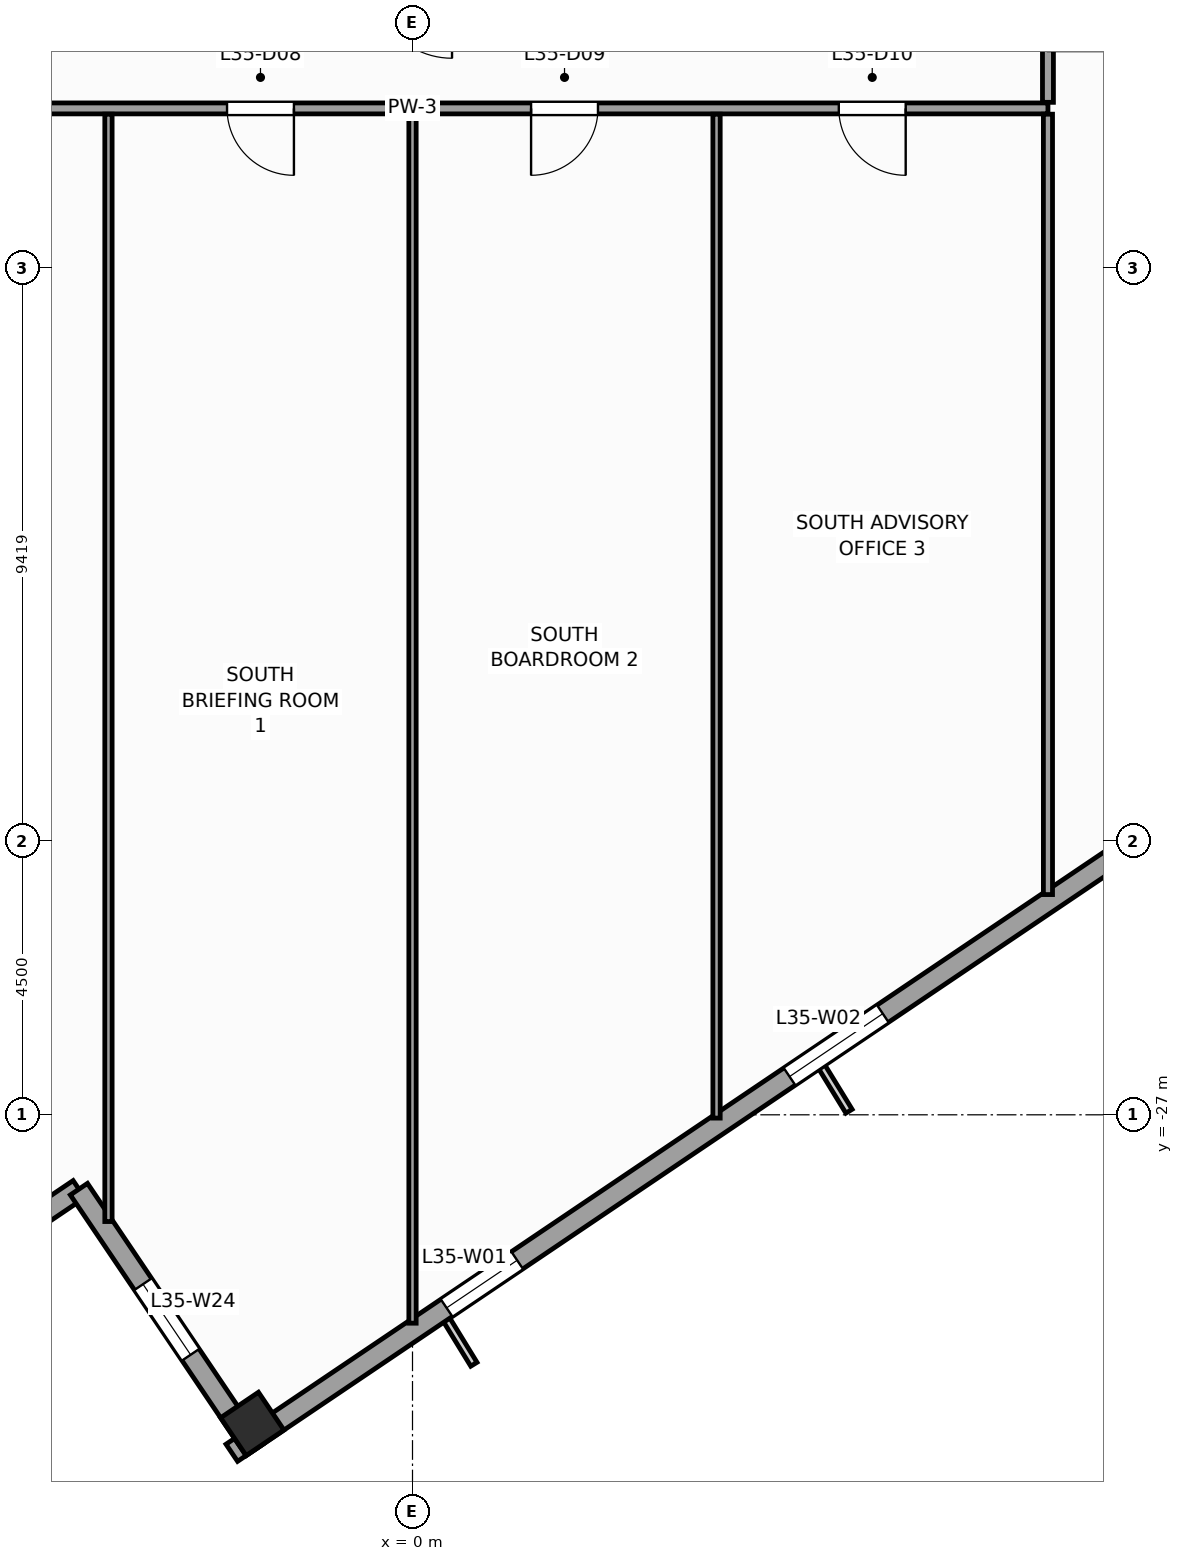
"""IFC4 building model, lengths in metres.
Left out: names, types, materials, properties, quantities, classifications, styles, units other than length and angle.
Written with IfcOpenShell. Run it as: python <this file> out.ifc"""

import sys

from ifc_helpers import new_model, si_unit, direction, frame, frame_2d, origin, origin_2d, place, context, subcontext, project, spatial, rectangle, extrude, source, transform, mapped, element, fill, save


model = new_model("IFC4")
c1 = context("Model", 3, precision=1e-05, world=origin(), true_north=direction((0.0, 1.0)))
c2 = subcontext(c1, "Body", "Model", "MODEL_VIEW")
j1 = project(units=[si_unit("LENGTHUNIT", "METRE"), si_unit("PLANEANGLEUNIT", "RADIAN")], contexts=[c1])
p1 = place(None, origin())
s1 = spatial("IfcSite", under=j1, at=p1, CompositionType="ELEMENT")
p2 = place(p1, origin())
s2 = spatial("IfcBuilding", under=s1, at=p2, CompositionType="ELEMENT")
p3 = place(p2, frame((0.0, 0.0, 148.4)))
s3 = spatial("IfcBuildingStorey", under=s2, at=p3, CompositionType="ELEMENT", Elevation=148.4)
m1 = source(origin(), c2, "Body", "SweptSolid", [
    extrude(rectangle(XDim=0.75, YDim=0.75, at=origin_2d()), origin(), (0.0, 0.0, 1.0), 4.0),
])
p4 = place(p3, frame((-2.635, -32.083, 0.0), z_axis=(0.0, 0.0, 1.0), x_axis=(0.829037572555, 0.559192903471, 0.0)))
e1 = element("IfcColumn", 1, at=p4, inside=s3, PredefinedType="COLUMN", context=c2, shape_type="MappedRepresentation", body=[
    mapped(m1, transform((0.0, 0.0, 0.0), scale=1.0)),
])
p5 = place(p3, frame((-2.972, -32.558, 0.0), z_axis=(0.0, 0.0, 1.0), x_axis=(0.829036218961, 0.559194910251, 0.0)))
e2 = element("IfcWall", 2, at=p5, inside=s3, PredefinedType="STANDARD", context=c2, shape_type="SweptSolid", body=[
    extrude(rectangle(XDim=41.34, YDim=0.34, at=frame_2d((20.67, 0.0))), origin(), (0.0, 0.0, 1.0), 3.04),
])
p6 = place(p5, frame((25.745, 0.0, 0.0)))
e3 = element("IfcOpeningElement", 3, at=p6, cuts=e2, PredefinedType="OPENING", context=c2, shape_type="SweptSolid", body=[
    extrude(rectangle(XDim=1.05, YDim=2.25, at=frame_2d((0.525, 1.125))), frame((0.0, 0.18, 0.0), z_axis=(0.0, -1.0, 0.0), x_axis=(1.0, 0.0, 0.0)), (0.0, 0.0, 1.0), 0.36),
])
p7 = place(p5, frame((4.261, 0.0, 0.56)))
e4 = element("IfcOpeningElement", 4, at=p7, cuts=e2, PredefinedType="OPENING", context=c2, shape_type="SweptSolid", body=[
    extrude(rectangle(XDim=1.4, YDim=2.4, at=frame_2d((0.7, 1.2))), frame((0.0, 0.18, 0.0), z_axis=(0.0, -1.0, 0.0), x_axis=(1.0, 0.0, 0.0)), (0.0, 0.0, 1.0), 0.36),
])
p8 = place(p5, frame((11.064, 0.0, 0.61)))
e5 = element("IfcOpeningElement", 5, at=p8, cuts=e2, PredefinedType="OPENING", context=c2, shape_type="SweptSolid", body=[
    extrude(rectangle(XDim=1.85, YDim=2.35, at=frame_2d((0.925, 1.175))), frame((0.0, 0.18, 0.0), z_axis=(0.0, -1.0, 0.0), x_axis=(1.0, 0.0, 0.0)), (0.0, 0.0, 1.0), 0.36),
])
p9 = place(p5, frame((18.168, 0.0, 0.61)))
e6 = element("IfcOpeningElement", 6, at=p9, cuts=e2, PredefinedType="OPENING", context=c2, shape_type="SweptSolid", body=[
    extrude(rectangle(XDim=1.85, YDim=2.35, at=frame_2d((0.925, 1.175))), frame((0.0, 0.18, 0.0), z_axis=(0.0, -1.0, 0.0), x_axis=(1.0, 0.0, 0.0)), (0.0, 0.0, 1.0), 0.36),
])
p10 = place(p5, frame((27.936, 0.0, 0.61)))
e7 = element("IfcOpeningElement", 7, at=p10, cuts=e2, PredefinedType="OPENING", context=c2, shape_type="SweptSolid", body=[
    extrude(rectangle(XDim=1.85, YDim=2.35, at=frame_2d((0.925, 1.175))), frame((0.0, 0.18, 0.0), z_axis=(0.0, -1.0, 0.0), x_axis=(1.0, 0.0, 0.0)), (0.0, 0.0, 1.0), 0.36),
])
p11 = place(p5, frame((34.852, 0.0, 0.56)))
e8 = element("IfcOpeningElement", 8, at=p11, cuts=e2, PredefinedType="OPENING", context=c2, shape_type="SweptSolid", body=[
    extrude(rectangle(XDim=1.4, YDim=2.4, at=frame_2d((0.7, 1.2))), frame((0.0, 0.18, 0.0), z_axis=(0.0, -1.0, 0.0), x_axis=(1.0, 0.0, 0.0)), (0.0, 0.0, 1.0), 0.36),
])
p12 = place(p3, frame((-9.631, -31.019, 0.0), z_axis=(0.0, 0.0, 1.0), x_axis=(0.829025804298, 0.559210350234, 0.0)))
e9 = element("IfcWall", 9, at=p12, inside=s3, PredefinedType="STANDARD", context=c2, shape_type="SweptSolid", body=[
    extrude(rectangle(XDim=5.0, YDim=0.34, at=frame_2d((2.5, 0.0))), origin(), (0.0, 0.0, 1.0), 3.74),
])
p13 = place(p3, frame((-5.486, -28.223, 0.0), z_axis=(0.0, 0.0, 1.0), x_axis=(0.559171107879, -0.82905227345, 0.0)))
e10 = element("IfcWall", 10, at=p13, inside=s3, PredefinedType="STANDARD", context=c2, shape_type="SweptSolid", body=[
    extrude(rectangle(XDim=5.17, YDim=0.34, at=frame_2d((2.585, 0.0))), origin(), (0.0, 0.0, 1.0), 3.04),
])
p14 = place(p13, frame((1.885, 0.0, 0.56)))
e11 = element("IfcOpeningElement", 11, at=p14, cuts=e10, PredefinedType="OPENING", context=c2, shape_type="SweptSolid", body=[
    extrude(rectangle(XDim=1.4, YDim=2.4, at=frame_2d((0.7, 1.2))), frame((0.0, 0.18, 0.0), z_axis=(0.0, -1.0, 0.0), x_axis=(1.0, 0.0, 0.0)), (0.0, 0.0, 1.0), 0.36),
])
p15 = place(p3, frame((-10.45, -10.45, 0.0), z_axis=(0.0, 0.0, 1.0), x_axis=(1.0, 0.0, 0.0)))
e12 = element("IfcWall", 12, at=p15, inside=s3, PredefinedType="PARTITIONING", context=c2, shape_type="SweptSolid", body=[
    extrude(rectangle(XDim=20.9, YDim=0.18, at=frame_2d((10.45, 0.0))), origin(), (0.0, 0.0, 1.0), 3.74),
])
p16 = place(p15, frame((2.339, 0.0, 0.0)))
e13 = element("IfcOpeningElement", 13, at=p16, cuts=e12, PredefinedType="OPENING", context=c2, shape_type="SweptSolid", body=[
    extrude(rectangle(XDim=1.1, YDim=2.2, at=frame_2d((0.55, 1.1))), frame((0.0, 0.1, 0.0), z_axis=(0.0, -1.0, 0.0), x_axis=(1.0, 0.0, 0.0)), (0.0, 0.0, 1.0), 0.2),
])
p17 = place(p15, frame((7.4, 0.0, 0.0)))
e14 = element("IfcOpeningElement", 14, at=p17, cuts=e12, PredefinedType="OPENING", context=c2, shape_type="SweptSolid", body=[
    extrude(rectangle(XDim=1.1, YDim=2.2, at=frame_2d((0.55, 1.1))), frame((0.0, 0.1, 0.0), z_axis=(0.0, -1.0, 0.0), x_axis=(1.0, 0.0, 0.0)), (0.0, 0.0, 1.0), 0.2),
])
p18 = place(p15, frame((12.4, 0.0, 0.0)))
e15 = element("IfcOpeningElement", 15, at=p18, cuts=e12, PredefinedType="OPENING", context=c2, shape_type="SweptSolid", body=[
    extrude(rectangle(XDim=1.1, YDim=2.2, at=frame_2d((0.55, 1.1))), frame((0.0, 0.1, 0.0), z_axis=(0.0, -1.0, 0.0), x_axis=(1.0, 0.0, 0.0)), (0.0, 0.0, 1.0), 0.2),
])
p19 = place(p15, frame((17.46, 0.0, 0.0)))
e16 = element("IfcOpeningElement", 16, at=p19, cuts=e12, PredefinedType="OPENING", context=c2, shape_type="SweptSolid", body=[
    extrude(rectangle(XDim=1.1, YDim=2.2, at=frame_2d((0.55, 1.1))), frame((0.0, 0.1, 0.0), z_axis=(0.0, -1.0, 0.0), x_axis=(1.0, 0.0, 0.0)), (0.0, 0.0, 1.0), 0.2),
])
p20 = place(p3, frame((10.45, -10.35, 0.0), z_axis=(0.0, 0.0, 1.0), x_axis=(0.0, 1.0, 0.0)))
e17 = element("IfcWall", 17, at=p20, inside=s3, PredefinedType="PARTITIONING", context=c2, shape_type="SweptSolid", body=[
    extrude(rectangle(XDim=8.95, YDim=0.18, at=frame_2d((4.475, 0.0))), origin(), (0.0, 0.0, 1.0), 3.74),
])
p21 = place(p20, frame((1.455, 0.0, 0.0)))
e18 = element("IfcOpeningElement", 18, at=p21, cuts=e17, PredefinedType="OPENING", context=c2, shape_type="SweptSolid", body=[
    extrude(rectangle(XDim=0.95, YDim=2.1, at=frame_2d((0.475, 1.05))), frame((0.0, 0.1, 0.0), z_axis=(0.0, -1.0, 0.0), x_axis=(1.0, 0.0, 0.0)), (0.0, 0.0, 1.0), 0.2),
])
p22 = place(p20, frame((3.879, 0.0, 0.0)))
e19 = element("IfcOpeningElement", 19, at=p22, cuts=e17, PredefinedType="OPENING", context=c2, shape_type="SweptSolid", body=[
    extrude(rectangle(XDim=0.95, YDim=2.1, at=frame_2d((0.475, 1.05))), frame((0.0, 0.1, 0.0), z_axis=(0.0, -1.0, 0.0), x_axis=(1.0, 0.0, 0.0)), (0.0, 0.0, 1.0), 0.2),
])
p23 = place(p20, frame((6.494, 0.0, 0.0)))
e20 = element("IfcOpeningElement", 20, at=p23, cuts=e17, PredefinedType="OPENING", context=c2, shape_type="SweptSolid", body=[
    extrude(rectangle(XDim=1.1, YDim=2.2, at=frame_2d((0.55, 1.1))), frame((0.0, 0.1, 0.0), z_axis=(0.0, -1.0, 0.0), x_axis=(1.0, 0.0, 0.0)), (0.0, 0.0, 1.0), 0.2),
])
p24 = place(p3, frame((-5.0, -28.755, 0.0), z_axis=(0.0, 0.0, 1.0), x_axis=(0.0, 1.0, 0.0)))
e21 = element("IfcWall", 21, at=p24, inside=s3, PredefinedType="PARTITIONING", context=c2, shape_type="SweptSolid", body=[
    extrude(rectangle(XDim=18.21, YDim=0.12, at=frame_2d((9.105, 0.0))), origin(), (0.0, 0.0, 1.0), 3.74),
])
p25 = place(p3, frame((0.0, -30.427, 0.0), z_axis=(0.0, 0.0, 1.0), x_axis=(0.0, 1.0, 0.0)))
e22 = element("IfcWall", 22, at=p25, inside=s3, PredefinedType="PARTITIONING", context=c2, shape_type="SweptSolid", body=[
    extrude(rectangle(XDim=19.882, YDim=0.12, at=frame_2d((9.941, 0.0))), origin(), (0.0, 0.0, 1.0), 3.74),
])
p26 = place(p3, frame((5.0, -27.054, 0.0), z_axis=(0.0, 0.0, 1.0), x_axis=(0.0, 1.0, 0.0)))
e23 = element("IfcWall", 23, at=p26, inside=s3, PredefinedType="PARTITIONING", context=c2, shape_type="SweptSolid", body=[
    extrude(rectangle(XDim=16.509, YDim=0.12, at=frame_2d((8.255, 0.0))), origin(), (0.0, 0.0, 1.0), 3.74),
])
p27 = place(p3, frame((10.45, -23.378, 0.0), z_axis=(0.0, 0.0, 1.0), x_axis=(0.0, 1.0, 0.0)))
e24 = element("IfcWall", 24, at=p27, inside=s3, PredefinedType="PARTITIONING", context=c2, shape_type="SweptSolid", body=[
    extrude(rectangle(XDim=12.833, YDim=0.15, at=frame_2d((6.417, 0.0))), origin(), (0.0, 0.0, 1.0), 3.74),
])
m2 = source(origin(), c2, "Body", "SweptSolid", [
    extrude(rectangle(XDim=1.4, YDim=2.4, at=frame_2d((0.7, 1.2))), frame((0.0, 0.03, 0.0), z_axis=(0.0, -1.0, 0.0), x_axis=(1.0, 0.0, 0.0)), (0.0, 0.0, 1.0), 0.06),
])
p28 = place(p7, origin())
e25 = element("IfcWindow", 25, at=p28, inside=s3, PartitioningType="SINGLE_PANEL", PredefinedType="WINDOW", context=c2, shape_type="MappedRepresentation", body=[
    mapped(m2, transform((0.0, 0.0, 0.0), scale=1.0)),
])
fill(e4, e25)
m3 = source(origin(), c2, "Body", "SweptSolid", [
    extrude(rectangle(XDim=1.85, YDim=2.35, at=frame_2d((0.925, 1.175))), frame((0.0, 0.03, 0.0), z_axis=(0.0, -1.0, 0.0), x_axis=(1.0, 0.0, 0.0)), (0.0, 0.0, 1.0), 0.06),
])
p29 = place(p8, origin())
e26 = element("IfcWindow", 26, at=p29, inside=s3, PartitioningType="SINGLE_PANEL", PredefinedType="WINDOW", context=c2, shape_type="MappedRepresentation", body=[
    mapped(m3, transform((0.0, 0.0, 0.0), scale=1.0)),
])
fill(e5, e26)
p30 = place(p14, origin())
e27 = element("IfcWindow", 27, at=p30, inside=s3, PartitioningType="SINGLE_PANEL", PredefinedType="WINDOW", context=c2, shape_type="MappedRepresentation", body=[
    mapped(m2, transform((0.0, 0.0, 0.0), scale=1.0)),
])
fill(e11, e27)
m4 = source(origin(), c2, "Body", "SweptSolid", [
    extrude(rectangle(XDim=1.1, YDim=2.2, at=frame_2d((0.55, 1.1))), frame((0.0, 0.025, 0.0), z_axis=(0.0, -1.0, 0.0), x_axis=(1.0, 0.0, 0.0)), (0.0, 0.0, 1.0), 0.05),
])
p31 = place(p17, frame((1.1, 0.0, 0.0), z_axis=(0.0, 0.0, 1.0), x_axis=(-1.0, 0.0, 0.0)))
e28 = element("IfcDoor", 28, at=p31, inside=s3, OperationType="SINGLE_SWING_RIGHT", PredefinedType="DOOR", context=c2, shape_type="MappedRepresentation", body=[
    mapped(m4, transform((0.0, 0.0, 0.0), scale=1.0)),
])
fill(e14, e28)
p32 = place(p18, frame((1.1, 0.0, 0.0), z_axis=(0.0, 0.0, 1.0), x_axis=(-1.0, 0.0, 0.0)))
e29 = element("IfcDoor", 29, at=p32, inside=s3, OperationType="SINGLE_SWING_LEFT", PredefinedType="DOOR", context=c2, shape_type="MappedRepresentation", body=[
    mapped(m4, transform((0.0, 0.0, 0.0), scale=1.0)),
])
fill(e15, e29)
p33 = place(p19, frame((1.1, 0.0, 0.0), z_axis=(0.0, 0.0, 1.0), x_axis=(-1.0, 0.0, 0.0)))
e30 = element("IfcDoor", 30, at=p33, inside=s3, OperationType="SINGLE_SWING_RIGHT", PredefinedType="DOOR", context=c2, shape_type="MappedRepresentation", body=[
    mapped(m4, transform((0.0, 0.0, 0.0), scale=1.0)),
])
fill(e16, e30)
save(model, sys.argv[1])
